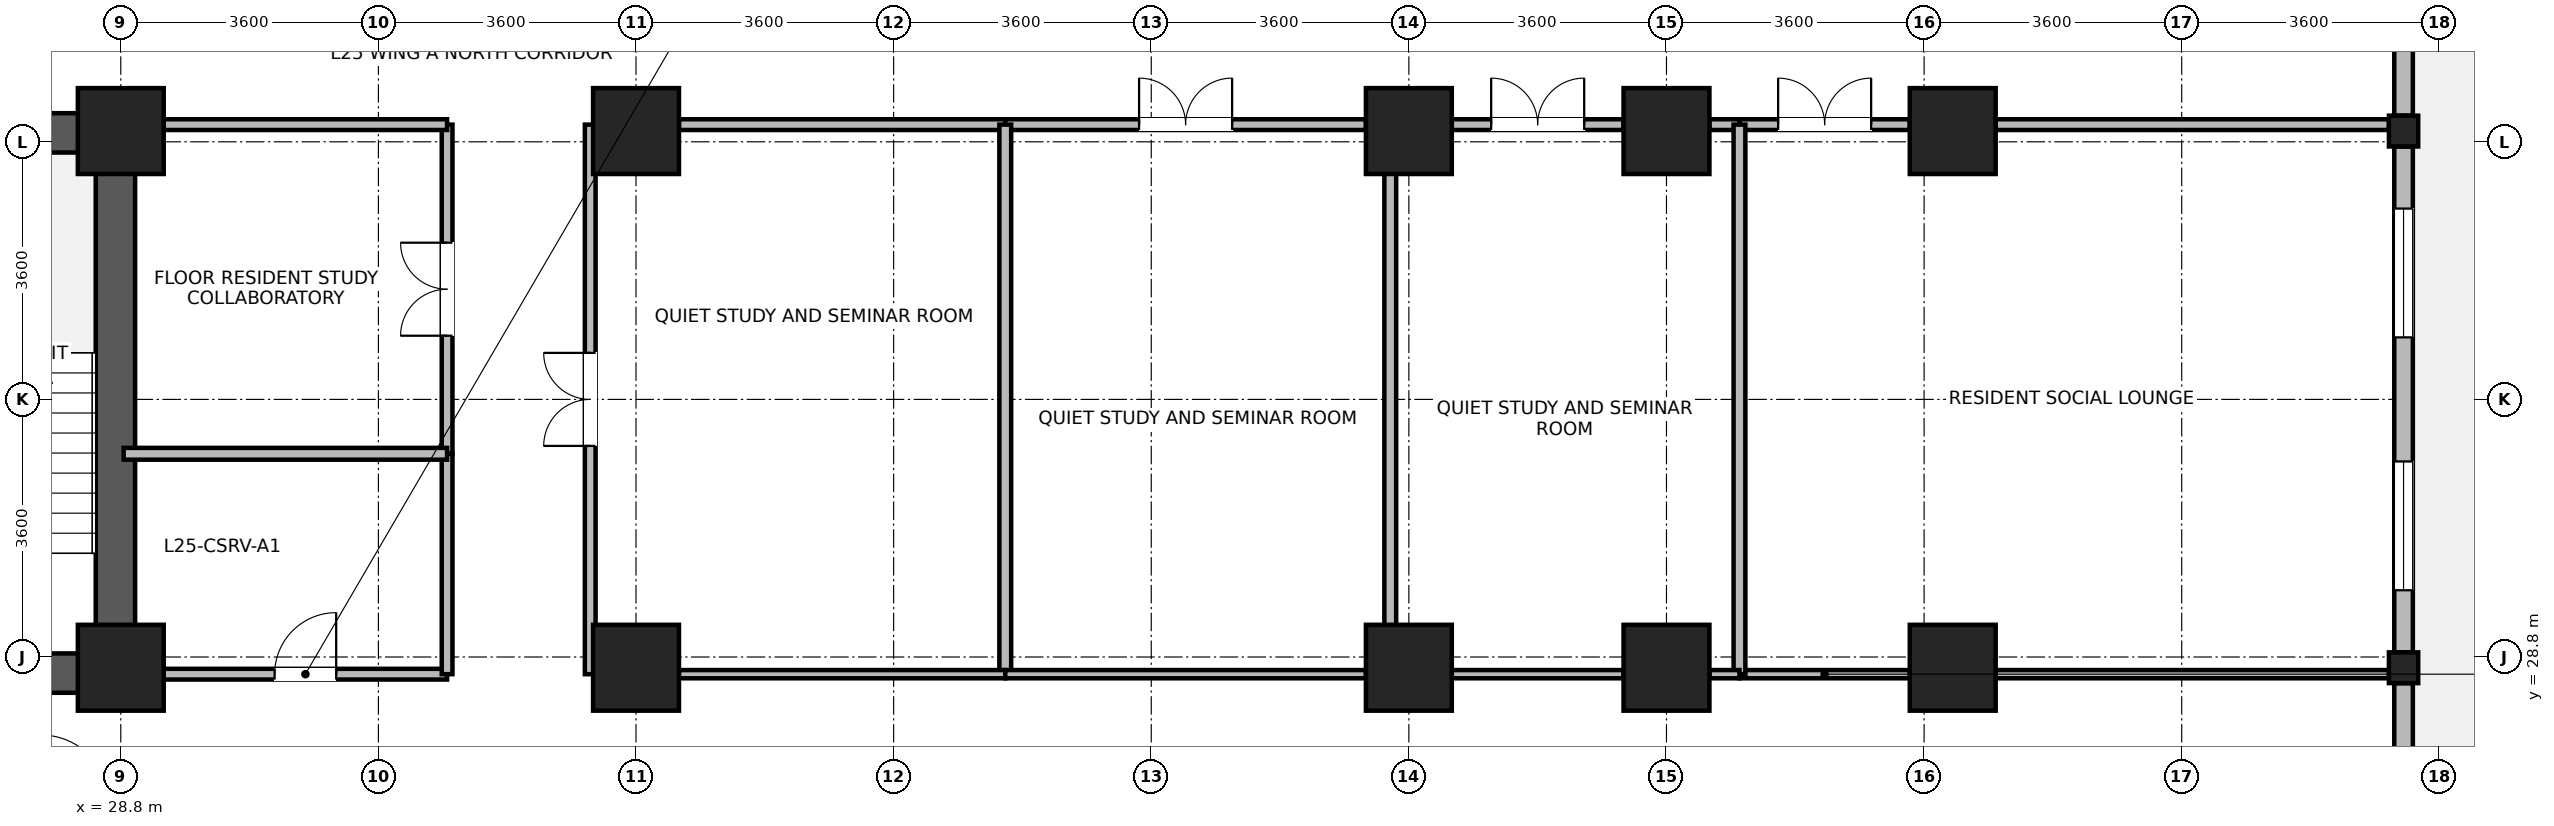
"""IFC4 building model, lengths in metres.
Left out: names, types, materials, properties, quantities, classifications, styles, units other than length and angle.
Written with IfcOpenShell. Run it as: python <this file> out.ifc"""

import sys

from ifc_helpers import new_model, si_unit, direction, frame, frame_2d, origin, origin_2d, place, context, subcontext, project, spatial, rectangle, i_section, extrude, source, transform, mapped, element, fill, save


model = new_model("IFC4")
c1 = context("Model", 3, precision=1e-05, world=origin(), true_north=direction((0.0, 1.0)))
c2 = subcontext(c1, "Body", "Model", "MODEL_VIEW")
j1 = project(units=[si_unit("LENGTHUNIT", "METRE"), si_unit("PLANEANGLEUNIT", "RADIAN")], contexts=[c1])
p1 = place(None, origin())
s1 = spatial("IfcSite", under=j1, at=p1, CompositionType="ELEMENT")
p2 = place(p1, origin())
s2 = spatial("IfcBuilding", under=s1, at=p2, CompositionType="ELEMENT")
p3 = place(p2, frame((0.0, 0.0, 100.8)))
s3 = spatial("IfcBuildingStorey", under=s2, at=p3, CompositionType="ELEMENT", Elevation=100.8)
p4 = place(p3, frame((28.725, 28.3, 0.0), z_axis=(0.0, 0.0, 1.0), x_axis=(0.0, 1.0, 0.0)))
e1 = element("IfcWall", 1, at=p4, inside=s3, PredefinedType="SHEAR", context=c2, shape_type="SweptSolid", body=[
    extrude(rectangle(XDim=8.1, YDim=0.55, at=frame_2d((4.05, 0.0))), origin(), (0.0, 0.0, 1.0), 3.45),
])
for number, where, z_axis, x_axis in (
    (2, (25.25, 28.575, 0.0), (0.0, 0.0, 1.0), (1.0, 0.0, 0.0)),
    (3, (25.25, 36.125, 0.0), (0.0, 0.0, 1.0), (1.0, 0.0, 0.0)),
):
    element("IfcWall", number, at=place(p3, frame(where, z_axis=z_axis, x_axis=x_axis)), inside=s3, PredefinedType="SHEAR", context=c2, shape_type="SweptSolid", body=[
        extrude(rectangle(XDim=3.2, YDim=0.55, at=frame_2d((1.6, 0.0))), origin(), (0.0, 0.0, 1.0), 3.45),
    ])
m1 = source(origin(), c2, "Body", "SweptSolid", [
    extrude(rectangle(XDim=1.2, YDim=1.2, at=origin_2d()), origin(), (0.0, 0.0, 1.0), 3.7),
])
for number, where, z_axis, x_axis in (
    (4, (28.8, 28.65, 0.0), (0.0, 0.0, 1.0), (1.0, 0.0, 0.0)),
    (5, (28.8, 36.15, 0.0), (0.0, 0.0, 1.0), (1.0, 0.0, 0.0)),
    (6, (36.0, 28.65, 0.0), (0.0, 0.0, 1.0), (1.0, 0.0, 0.0)),
    (7, (36.0, 36.15, 0.0), (0.0, 0.0, 1.0), (1.0, 0.0, 0.0)),
    (8, (46.8, 28.65, 0.0), (0.0, 0.0, 1.0), (1.0, 0.0, 0.0)),
    (9, (46.8, 36.15, 0.0), (0.0, 0.0, 1.0), (1.0, 0.0, 0.0)),
    (10, (50.4, 28.65, 0.0), (0.0, 0.0, 1.0), (1.0, 0.0, 0.0)),
    (11, (50.4, 36.15, 0.0), (0.0, 0.0, 1.0), (1.0, 0.0, 0.0)),
    (12, (54.4, 28.65, 0.0), (0.0, 0.0, 1.0), (1.0, 0.0, 0.0)),
    (13, (54.4, 36.15, 0.0), (0.0, 0.0, 1.0), (1.0, 0.0, 0.0)),
):
    element("IfcColumn", number, at=place(p3, frame(where, z_axis=z_axis, x_axis=x_axis)), inside=s3, PredefinedType="COLUMN", context=c2, shape_type="MappedRepresentation", body=[
        mapped(m1, transform((0.0, 0.0, 0.0), x_axis=(1.0, 0.0, 0.0), y_axis=(0.0, 1.0, 0.0), z_axis=(0.0, 0.0, 1.0), scale=1.0)),
    ])
m2 = source(origin(), c2, "Body", "SweptSolid", [
    extrude(i_section(OverallWidth=0.409, OverallDepth=0.43, WebThickness=0.024, FlangeThickness=0.033, FilletRadius=0.015, at=origin_2d()), origin(), (0.0, 0.0, 1.0), 3.7),
])
for number, where, z_axis, x_axis in (
    (14, (60.7, 28.65, 0.0), (0.0, 0.0, 1.0), (1.0, 0.0, 0.0)),
    (15, (60.7, 36.15, 0.0), (0.0, 0.0, 1.0), (1.0, 0.0, 0.0)),
):
    element("IfcColumn", number, at=place(p3, frame(where, z_axis=z_axis, x_axis=x_axis)), inside=s3, PredefinedType="COLUMN", context=c2, shape_type="MappedRepresentation", body=[
        mapped(m2, transform((0.0, 0.0, 0.0), x_axis=(1.0, 0.0, 0.0), y_axis=(0.0, 1.0, 0.0), z_axis=(0.0, 0.0, 1.0), scale=1.0)),
    ])
p5 = place(p3, frame((60.7, 28.434, 0.0), z_axis=(0.0, 0.0, 1.0), x_axis=(0.0, -1.0, 0.0)))
e16 = element("IfcWall", 16, at=p5, inside=s3, PredefinedType="STANDARD", context=c2, shape_type="SweptSolid", body=[
    extrude(rectangle(XDim=6.618, YDim=0.26, at=frame_2d((3.309, 0.0))), origin(), (0.0, 0.0, 1.0), 2.98),
])
p6 = place(p5, frame((4.063, 0.0, 0.85)))
e17 = element("IfcOpeningElement", 17, at=p6, cuts=e16, PredefinedType="OPENING", context=c2, shape_type="SweptSolid", body=[
    extrude(rectangle(XDim=1.8, YDim=1.85, at=frame_2d((0.9, 0.925))), frame((0.0, 0.14, 0.0), z_axis=(0.0, -1.0, 0.0), x_axis=(1.0, 0.0, 0.0)), (0.0, 0.0, 1.0), 0.28),
])
p7 = place(p5, frame((2.305, 0.0, 0.85)))
e18 = element("IfcOpeningElement", 18, at=p7, cuts=e16, PredefinedType="OPENING", context=c2, shape_type="SweptSolid", body=[
    extrude(rectangle(XDim=0.95, YDim=1.75, at=frame_2d((0.475, 0.875))), frame((0.0, 0.14, 0.0), z_axis=(0.0, -1.0, 0.0), x_axis=(1.0, 0.0, 0.0)), (0.0, 0.0, 1.0), 0.28),
])
p8 = place(p3, frame((60.7, 35.934, 0.0), z_axis=(0.0, 0.0, 1.0), x_axis=(0.0, -1.0, 0.0)))
e19 = element("IfcWall", 19, at=p8, inside=s3, PredefinedType="STANDARD", context=c2, shape_type="SweptSolid", body=[
    extrude(rectangle(XDim=7.068, YDim=0.26, at=frame_2d((3.534, 0.0))), origin(), (0.0, 0.0, 1.0), 2.98),
])
p9 = place(p8, frame((0.867, 0.0, 0.85)))
e20 = element("IfcOpeningElement", 20, at=p9, cuts=e19, PredefinedType="OPENING", context=c2, shape_type="SweptSolid", body=[
    extrude(rectangle(XDim=1.8, YDim=1.85, at=frame_2d((0.9, 0.925))), frame((0.0, 0.14, 0.0), z_axis=(0.0, -1.0, 0.0), x_axis=(1.0, 0.0, 0.0)), (0.0, 0.0, 1.0), 0.28),
])
p10 = place(p8, frame((4.401, 0.0, 0.85)))
e21 = element("IfcOpeningElement", 21, at=p10, cuts=e19, PredefinedType="OPENING", context=c2, shape_type="SweptSolid", body=[
    extrude(rectangle(XDim=1.8, YDim=1.85, at=frame_2d((0.9, 0.925))), frame((0.0, 0.14, 0.0), z_axis=(0.0, -1.0, 0.0), x_axis=(1.0, 0.0, 0.0)), (0.0, 0.0, 1.0), 0.28),
])
p11 = place(p3, frame((60.7, 43.33, 0.0), z_axis=(0.0, 0.0, 1.0), x_axis=(0.0, -1.0, 0.0)))
e22 = element("IfcWall", 22, at=p11, inside=s3, PredefinedType="STANDARD", context=c2, shape_type="SweptSolid", body=[
    extrude(rectangle(XDim=6.964, YDim=0.26, at=frame_2d((3.482, 0.0))), origin(), (0.0, 0.0, 1.0), 3.43),
])
p12 = place(p11, frame((0.841, 0.0, 0.85)))
e23 = element("IfcOpeningElement", 23, at=p12, cuts=e22, PredefinedType="OPENING", context=c2, shape_type="SweptSolid", body=[
    extrude(rectangle(XDim=1.8, YDim=1.85, at=frame_2d((0.9, 0.925))), frame((0.0, 0.14, 0.0), z_axis=(0.0, -1.0, 0.0), x_axis=(1.0, 0.0, 0.0)), (0.0, 0.0, 1.0), 0.28),
])
p13 = place(p11, frame((3.007, 0.0, 0.85)))
e24 = element("IfcOpeningElement", 24, at=p13, cuts=e22, PredefinedType="OPENING", context=c2, shape_type="SweptSolid", body=[
    extrude(rectangle(XDim=0.95, YDim=1.75, at=frame_2d((0.475, 0.875))), frame((0.0, 0.14, 0.0), z_axis=(0.0, -1.0, 0.0), x_axis=(1.0, 0.0, 0.0)), (0.0, 0.0, 1.0), 0.28),
])
p14 = place(p3, frame((51.42, 36.24, 0.0), z_axis=(0.0, 0.0, 1.0), x_axis=(1.0, 0.0, 0.0)))
e25 = element("IfcWall", 25, at=p14, inside=s3, PredefinedType="PARTITIONING", context=c2, shape_type="SweptSolid", body=[
    extrude(rectangle(XDim=2.38, YDim=0.15, at=frame_2d((1.19, 0.0))), origin(), (0.0, 0.0, 1.0), 2.78),
])
p15 = place(p14, frame((0.54, 0.0, 0.0)))
e26 = element("IfcOpeningElement", 26, at=p15, cuts=e25, PredefinedType="OPENING", context=c2, shape_type="SweptSolid", body=[
    extrude(rectangle(XDim=1.3, YDim=2.12, at=frame_2d((0.65, 1.06))), frame((0.0, 0.085, 0.0), z_axis=(0.0, -1.0, 0.0), x_axis=(1.0, 0.0, 0.0)), (0.0, 0.0, 1.0), 0.17),
])
p16 = place(p3, frame((55.0, 36.24, 0.0), z_axis=(0.0, 0.0, 1.0), x_axis=(1.0, 0.0, 0.0)))
e27 = element("IfcWall", 27, at=p16, inside=s3, PredefinedType="PARTITIONING", context=c2, shape_type="SweptSolid", body=[
    extrude(rectangle(XDim=5.496, YDim=0.15, at=frame_2d((2.748, 0.0))), origin(), (0.0, 0.0, 1.0), 2.78),
])
p17 = place(p3, frame((35.36, 28.56, 0.0), z_axis=(0.0, 0.0, 1.0), x_axis=(0.0, 1.0, 0.0)))
e28 = element("IfcWall", 28, at=p17, inside=s3, PredefinedType="PARTITIONING", context=c2, shape_type="SweptSolid", body=[
    extrude(rectangle(XDim=7.68, YDim=0.15, at=frame_2d((3.84, 0.0))), origin(), (0.0, 0.0, 1.0), 3.43),
])
p18 = place(p17, frame((3.19, 0.0, 0.0)))
e29 = element("IfcOpeningElement", 29, at=p18, cuts=e28, PredefinedType="OPENING", context=c2, shape_type="SweptSolid", body=[
    extrude(rectangle(XDim=1.3, YDim=2.12, at=frame_2d((0.65, 1.06))), frame((0.0, 0.085, 0.0), z_axis=(0.0, -1.0, 0.0), x_axis=(1.0, 0.0, 0.0)), (0.0, 0.0, 1.0), 0.17),
])
p19 = place(p3, frame((36.6, 36.24, 0.0), z_axis=(0.0, 0.0, 1.0), x_axis=(1.0, 0.0, 0.0)))
e30 = element("IfcWall", 30, at=p19, inside=s3, PredefinedType="PARTITIONING", context=c2, shape_type="SweptSolid", body=[
    extrude(rectangle(XDim=4.56, YDim=0.15, at=frame_2d((2.28, 0.0))), origin(), (0.0, 0.0, 1.0), 2.78),
])
p20 = place(p3, frame((41.16, 36.24, 0.0), z_axis=(0.0, 0.0, 1.0), x_axis=(1.0, 0.0, 0.0)))
e31 = element("IfcWall", 31, at=p20, inside=s3, PredefinedType="PARTITIONING", context=c2, shape_type="SweptSolid", body=[
    extrude(rectangle(XDim=5.04, YDim=0.15, at=frame_2d((2.52, 0.0))), origin(), (0.0, 0.0, 1.0), 2.78),
])
p21 = place(p20, frame((1.87, 0.0, 0.0)))
e32 = element("IfcOpeningElement", 32, at=p21, cuts=e31, PredefinedType="OPENING", context=c2, shape_type="SweptSolid", body=[
    extrude(rectangle(XDim=1.3, YDim=2.12, at=frame_2d((0.65, 1.06))), frame((0.0, 0.085, 0.0), z_axis=(0.0, -1.0, 0.0), x_axis=(1.0, 0.0, 0.0)), (0.0, 0.0, 1.0), 0.17),
])
p22 = place(p3, frame((47.4, 36.24, 0.0), z_axis=(0.0, 0.0, 1.0), x_axis=(1.0, 0.0, 0.0)))
e33 = element("IfcWall", 33, at=p22, inside=s3, PredefinedType="PARTITIONING", context=c2, shape_type="SweptSolid", body=[
    extrude(rectangle(XDim=2.4, YDim=0.15, at=frame_2d((1.2, 0.0))), origin(), (0.0, 0.0, 1.0), 2.78),
])
p23 = place(p22, frame((0.55, 0.0, 0.0)))
e34 = element("IfcOpeningElement", 34, at=p23, cuts=e33, PredefinedType="OPENING", context=c2, shape_type="SweptSolid", body=[
    extrude(rectangle(XDim=1.3, YDim=2.12, at=frame_2d((0.65, 1.06))), frame((0.0, 0.085, 0.0), z_axis=(0.0, -1.0, 0.0), x_axis=(1.0, 0.0, 0.0)), (0.0, 0.0, 1.0), 0.17),
])
p24 = place(p3, frame((51.0, 36.24, 0.0), z_axis=(0.0, 0.0, 1.0), x_axis=(1.0, 0.0, 0.0)))
e35 = element("IfcWall", 35, at=p24, inside=s3, PredefinedType="PARTITIONING", context=c2, shape_type="SweptSolid", body=[
    extrude(rectangle(XDim=0.42, YDim=0.15, at=frame_2d((0.21, 0.0))), origin(), (0.0, 0.0, 1.0), 2.78),
])
p25 = place(p3, frame((33.36, 31.64, 0.0), z_axis=(0.0, 0.0, 1.0), x_axis=(0.0, 1.0, 0.0)))
e36 = element("IfcWall", 36, at=p25, inside=s3, PredefinedType="PARTITIONING", context=c2, shape_type="SweptSolid", body=[
    extrude(rectangle(XDim=4.6, YDim=0.15, at=frame_2d((2.3, 0.0))), origin(), (0.0, 0.0, 1.0), 3.43),
])
p26 = place(p25, frame((1.65, 0.0, 0.0)))
e37 = element("IfcOpeningElement", 37, at=p26, cuts=e36, PredefinedType="OPENING", context=c2, shape_type="SweptSolid", body=[
    extrude(rectangle(XDim=1.3, YDim=2.12, at=frame_2d((0.65, 1.06))), frame((0.0, 0.085, 0.0), z_axis=(0.0, -1.0, 0.0), x_axis=(1.0, 0.0, 0.0)), (0.0, 0.0, 1.0), 0.17),
])
p27 = place(p3, frame((29.4, 28.56, 0.0), z_axis=(0.0, 0.0, 1.0), x_axis=(1.0, 0.0, 0.0)))
e38 = element("IfcWall", 38, at=p27, inside=s3, PredefinedType="PARTITIONING", context=c2, shape_type="SweptSolid", body=[
    extrude(rectangle(XDim=3.96, YDim=0.15, at=frame_2d((1.98, 0.0))), origin(), (0.0, 0.0, 1.0), 2.78),
])
p28 = place(p27, frame((1.55, 0.0, 0.0)))
e39 = element("IfcOpeningElement", 39, at=p28, cuts=e38, PredefinedType="OPENING", context=c2, shape_type="SweptSolid", body=[
    extrude(rectangle(XDim=0.86, YDim=2.02, at=frame_2d((0.43, 1.01))), frame((0.0, 0.085, 0.0), z_axis=(0.0, -1.0, 0.0), x_axis=(1.0, 0.0, 0.0)), (0.0, 0.0, 1.0), 0.17),
])
p29 = place(p3, frame((29.4, 36.24, 0.0), z_axis=(0.0, 0.0, 1.0), x_axis=(1.0, 0.0, 0.0)))
e40 = element("IfcWall", 40, at=p29, inside=s3, PredefinedType="PARTITIONING", context=c2, shape_type="SweptSolid", body=[
    extrude(rectangle(XDim=3.96, YDim=0.15, at=frame_2d((1.98, 0.0))), origin(), (0.0, 0.0, 1.0), 2.78),
])
p30 = place(p3, frame((33.36, 28.56, 0.0), z_axis=(0.0, 0.0, 1.0), x_axis=(0.0, 1.0, 0.0)))
e41 = element("IfcWall", 41, at=p30, inside=s3, PredefinedType="PARTITIONING", context=c2, shape_type="SweptSolid", body=[
    extrude(rectangle(XDim=3.08, YDim=0.15, at=frame_2d((1.54, 0.0))), origin(), (0.0, 0.0, 1.0), 3.43),
])
p31 = place(p3, frame((51.42, 28.56, 0.0), z_axis=(0.0, 0.0, 1.0), x_axis=(1.0, 0.0, 0.0)))
e42 = element("IfcWall", 42, at=p31, inside=s3, PredefinedType="PARTITIONING", context=c2, shape_type="SweptSolid", body=[
    extrude(rectangle(XDim=2.38, YDim=0.115, at=frame_2d((1.19, 0.0))), origin(), (0.0, 0.0, 1.0), 2.78),
])
p32 = place(p3, frame((55.0, 28.56, 0.0), z_axis=(0.0, 0.0, 1.0), x_axis=(1.0, 0.0, 0.0)))
e43 = element("IfcWall", 43, at=p32, inside=s3, PredefinedType="PARTITIONING", context=c2, shape_type="SweptSolid", body=[
    extrude(rectangle(XDim=5.496, YDim=0.115, at=frame_2d((2.748, 0.0))), origin(), (0.0, 0.0, 1.0), 2.78),
])
for number, where, z_axis, x_axis in (
    (44, (41.16, 28.56, 0.0), (0.0, 0.0, 1.0), (0.0, 1.0, 0.0)),
    (45, (46.54, 28.56, 0.0), (0.0, 0.0, 1.0), (0.0, 1.0, 0.0)),
    (46, (51.42, 28.56, 0.0), (0.0, 0.0, 1.0), (0.0, 1.0, 0.0)),
):
    element("IfcWall", number, at=place(p3, frame(where, z_axis=z_axis, x_axis=x_axis)), inside=s3, PredefinedType="PARTITIONING", context=c2, shape_type="SweptSolid", body=[
        extrude(rectangle(XDim=7.68, YDim=0.165, at=frame_2d((3.84, 0.0))), origin(), (0.0, 0.0, 1.0), 3.43),
    ])
p33 = place(p3, frame((36.6, 28.56, 0.0), z_axis=(0.0, 0.0, 1.0), x_axis=(1.0, 0.0, 0.0)))
e47 = element("IfcWall", 47, at=p33, inside=s3, PredefinedType="PARTITIONING", context=c2, shape_type="SweptSolid", body=[
    extrude(rectangle(XDim=4.56, YDim=0.115, at=frame_2d((2.28, 0.0))), origin(), (0.0, 0.0, 1.0), 2.78),
])
p34 = place(p3, frame((41.16, 28.56, 0.0), z_axis=(0.0, 0.0, 1.0), x_axis=(1.0, 0.0, 0.0)))
e48 = element("IfcWall", 48, at=p34, inside=s3, PredefinedType="PARTITIONING", context=c2, shape_type="SweptSolid", body=[
    extrude(rectangle(XDim=5.04, YDim=0.115, at=frame_2d((2.52, 0.0))), origin(), (0.0, 0.0, 1.0), 2.78),
])
p35 = place(p3, frame((47.4, 28.56, 0.0), z_axis=(0.0, 0.0, 1.0), x_axis=(1.0, 0.0, 0.0)))
e49 = element("IfcWall", 49, at=p35, inside=s3, PredefinedType="PARTITIONING", context=c2, shape_type="SweptSolid", body=[
    extrude(rectangle(XDim=2.4, YDim=0.115, at=frame_2d((1.2, 0.0))), origin(), (0.0, 0.0, 1.0), 2.78),
])
p36 = place(p3, frame((51.0, 28.56, 0.0), z_axis=(0.0, 0.0, 1.0), x_axis=(1.0, 0.0, 0.0)))
e50 = element("IfcWall", 50, at=p36, inside=s3, PredefinedType="PARTITIONING", context=c2, shape_type="SweptSolid", body=[
    extrude(rectangle(XDim=0.42, YDim=0.115, at=frame_2d((0.21, 0.0))), origin(), (0.0, 0.0, 1.0), 2.78),
])
p37 = place(p3, frame((28.84, 31.64, 0.0), z_axis=(0.0, 0.0, 1.0), x_axis=(1.0, 0.0, 0.0)))
e51 = element("IfcWall", 51, at=p37, inside=s3, PredefinedType="PARTITIONING", context=c2, shape_type="SweptSolid", body=[
    extrude(rectangle(XDim=4.52, YDim=0.165, at=frame_2d((2.26, 0.0))), origin(), (0.0, 0.0, 1.0), 3.43),
])
p38 = place(p9, origin())
e52 = element("IfcWindow", 52, at=p38, inside=s3, PartitioningType="SINGLE_PANEL", PredefinedType="WINDOW", context=c2, shape_type="SweptSolid", body=[
    extrude(rectangle(XDim=1.8, YDim=1.85, at=frame_2d((0.9, 0.925))), frame((0.0, 0.03, 0.0), z_axis=(0.0, -1.0, 0.0), x_axis=(1.0, 0.0, 0.0)), (0.0, 0.0, 1.0), 0.06),
])
fill(e20, e52)
p39 = place(p10, origin())
e53 = element("IfcWindow", 53, at=p39, inside=s3, PartitioningType="SINGLE_PANEL", PredefinedType="WINDOW", context=c2, shape_type="SweptSolid", body=[
    extrude(rectangle(XDim=1.8, YDim=1.85, at=frame_2d((0.9, 0.925))), frame((0.0, 0.03, 0.0), z_axis=(0.0, -1.0, 0.0), x_axis=(1.0, 0.0, 0.0)), (0.0, 0.0, 1.0), 0.06),
])
fill(e21, e53)
p40 = place(p15, origin())
e54 = element("IfcDoor", 54, at=p40, inside=s3, OperationType="DOUBLE_DOOR_SINGLE_SWING", PredefinedType="DOOR", context=c2, shape_type="SweptSolid", body=[
    extrude(rectangle(XDim=1.3, YDim=2.12, at=frame_2d((0.65, 1.06))), frame((0.0, 0.025, 0.0), z_axis=(0.0, -1.0, 0.0), x_axis=(1.0, 0.0, 0.0)), (0.0, 0.0, 1.0), 0.05),
])
fill(e26, e54)
p41 = place(p18, origin())
e55 = element("IfcDoor", 55, at=p41, inside=s3, OperationType="DOUBLE_DOOR_SINGLE_SWING", PredefinedType="DOOR", context=c2, shape_type="SweptSolid", body=[
    extrude(rectangle(XDim=1.3, YDim=2.12, at=frame_2d((0.65, 1.06))), frame((0.0, 0.025, 0.0), z_axis=(0.0, -1.0, 0.0), x_axis=(1.0, 0.0, 0.0)), (0.0, 0.0, 1.0), 0.05),
])
fill(e29, e55)
p42 = place(p21, origin())
e56 = element("IfcDoor", 56, at=p42, inside=s3, OperationType="DOUBLE_DOOR_SINGLE_SWING", PredefinedType="DOOR", context=c2, shape_type="SweptSolid", body=[
    extrude(rectangle(XDim=1.3, YDim=2.12, at=frame_2d((0.65, 1.06))), frame((0.0, 0.025, 0.0), z_axis=(0.0, -1.0, 0.0), x_axis=(1.0, 0.0, 0.0)), (0.0, 0.0, 1.0), 0.05),
])
fill(e32, e56)
p43 = place(p23, origin())
e57 = element("IfcDoor", 57, at=p43, inside=s3, OperationType="DOUBLE_DOOR_SINGLE_SWING", PredefinedType="DOOR", context=c2, shape_type="SweptSolid", body=[
    extrude(rectangle(XDim=1.3, YDim=2.12, at=frame_2d((0.65, 1.06))), frame((0.0, 0.025, 0.0), z_axis=(0.0, -1.0, 0.0), x_axis=(1.0, 0.0, 0.0)), (0.0, 0.0, 1.0), 0.05),
])
fill(e34, e57)
p44 = place(p26, origin())
e58 = element("IfcDoor", 58, at=p44, inside=s3, OperationType="DOUBLE_DOOR_SINGLE_SWING", PredefinedType="DOOR", context=c2, shape_type="SweptSolid", body=[
    extrude(rectangle(XDim=1.3, YDim=2.12, at=frame_2d((0.65, 1.06))), frame((0.0, 0.025, 0.0), z_axis=(0.0, -1.0, 0.0), x_axis=(1.0, 0.0, 0.0)), (0.0, 0.0, 1.0), 0.05),
])
fill(e37, e58)
p45 = place(p28, origin())
e59 = element("IfcDoor", 59, at=p45, inside=s3, OperationType="SINGLE_SWING_RIGHT", PredefinedType="DOOR", context=c2, shape_type="SweptSolid", body=[
    extrude(rectangle(XDim=0.86, YDim=2.02, at=frame_2d((0.43, 1.01))), frame((0.0, 0.025, 0.0), z_axis=(0.0, -1.0, 0.0), x_axis=(1.0, 0.0, 0.0)), (0.0, 0.0, 1.0), 0.05),
])
fill(e39, e59)
save(model, sys.argv[1])
